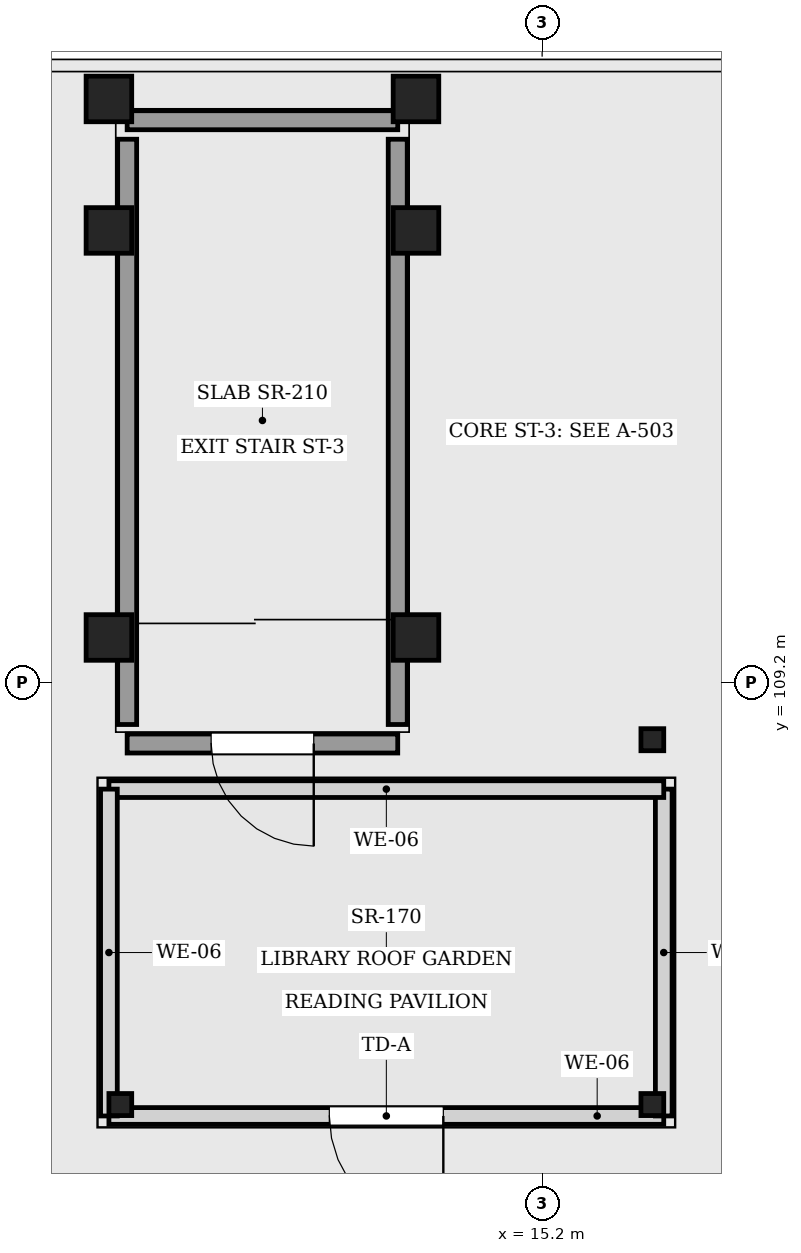
"""IFC4 building model, lengths in metres.
Left out: names, types, materials, properties, quantities, classifications, styles, units other than length and angle.
Written with IfcOpenShell. Run it as: python <this file> out.ifc"""

import sys

from ifc_helpers import new_model, si_unit, direction, frame, frame_2d, origin, origin_2d, place, context, subcontext, project, spatial, rectangle, i_section, extrude, element, fill, save


model = new_model("IFC4")
c1 = context("Model", 3, precision=1e-05, world=origin(), true_north=direction((0.0, 1.0)))
c2 = subcontext(c1, "Body", "Model", "MODEL_VIEW")
j1 = project(units=[si_unit("LENGTHUNIT", "METRE"), si_unit("PLANEANGLEUNIT", "RADIAN")], contexts=[c1])
p1 = place(None, origin())
s1 = spatial("IfcSite", under=j1, at=p1, CompositionType="ELEMENT")
p2 = place(p1, origin())
s2 = spatial("IfcBuilding", under=s1, at=p2, CompositionType="ELEMENT")
p3 = place(p2, frame((0.0, 0.0, 21.3)))
s3 = spatial("IfcBuildingStorey", under=s2, at=p3, CompositionType="ELEMENT", Elevation=21.3)
for number, where, z_axis, x_axis in (
    (1, (13.54, 109.795, 0.0), (0.0, 0.0, 1.0), (1.0, 0.0, 0.0)),
    (2, (9.5, 109.795, 0.0), (0.0, 0.0, 1.0), (1.0, 0.0, 0.0)),
    (3, (13.54, 115.15, 0.0), (0.0, 0.0, 1.0), (1.0, 0.0, 0.0)),
    (4, (9.5, 115.15, 0.0), (0.0, 0.0, 1.0), (1.0, 0.0, 0.0)),
    (5, (13.54, 116.88, 0.0), (0.0, 0.0, 1.0), (1.0, 0.0, 0.0)),
    (6, (9.5, 116.88, 0.0), (0.0, 0.0, 1.0), (1.0, 0.0, 0.0)),
):
    element("IfcColumn", number, at=place(p3, frame(where, z_axis=z_axis, x_axis=x_axis)), inside=s3, PredefinedType="COLUMN", context=c2, shape_type="SweptSolid", body=[
        extrude(rectangle(XDim=0.6, YDim=0.6, at=origin_2d()), origin(), (0.0, 0.0, 1.0), 3.1),
    ])
p4 = place(p3, frame((9.65, 103.65, 0.0), z_axis=(0.0, 0.0, 1.0), x_axis=(1.0, 0.0, 0.0)))
e7 = element("IfcColumn", 7, at=p4, inside=s3, PredefinedType="COLUMN", context=c2, shape_type="SweptSolid", body=[
    extrude(i_section(OverallWidth=0.3, OverallDepth=0.29, WebThickness=0.009, FlangeThickness=0.014, at=origin_2d()), origin(), (0.0, 0.0, 1.0), 3.0),
])
for number, where, z_axis, x_axis in (
    (8, (16.65, 103.65, 0.0), (0.0, 0.0, 1.0), (1.0, 0.0, 0.0)),
    (9, (16.65, 108.45, 0.0), (0.0, 0.0, 1.0), (1.0, 0.0, 0.0)),
):
    element("IfcColumn", number, at=place(p3, frame(where, z_axis=z_axis, x_axis=x_axis)), inside=s3, PredefinedType="COLUMN", context=c2, shape_type="SweptSolid", body=[
        extrude(i_section(OverallWidth=0.3, OverallDepth=0.29, WebThickness=0.009, FlangeThickness=0.014, at=origin_2d()), origin(), (0.0, 0.0, 1.0), 4.888),
    ])
p5 = place(p3, frame((16.8, 103.5, 0.0), z_axis=(0.0, 0.0, 1.0), x_axis=(-1.0, 0.0, 0.0)))
e10 = element("IfcWall", 10, at=p5, inside=s3, PredefinedType="STANDARD", context=c2, shape_type="SweptSolid", body=[
    extrude(rectangle(XDim=7.3, YDim=0.22, at=frame_2d((3.65, 0.0))), origin(), (0.0, 0.0, 1.0), 3.944),
])
p6 = place(p5, frame((2.9, 0.0, 0.0)))
e11 = element("IfcOpeningElement", 11, at=p6, cuts=e10, PredefinedType="OPENING", context=c2, shape_type="SweptSolid", body=[
    extrude(rectangle(XDim=1.5, YDim=2.2, at=frame_2d((0.75, 1.1))), frame((0.0, 0.12, 0.0), z_axis=(0.0, -1.0, 0.0), x_axis=(1.0, 0.0, 0.0)), (0.0, 0.0, 1.0), 0.24),
])
p7 = place(p3, frame((16.8, 107.8, 0.0), z_axis=(0.0, 0.0, 1.0), x_axis=(0.0, -1.0, 0.0)))
e12 = element("IfcWall", 12, at=p7, inside=s3, PredefinedType="STANDARD", context=c2, shape_type="SweptSolid", body=[
    extrude(rectangle(XDim=4.3, YDim=0.22, at=frame_2d((2.15, 0.0))), origin(), (0.0, 0.0, 1.0), 4.708),
])
p8 = place(p3, frame((9.5, 107.8, 0.0), z_axis=(0.0, 0.0, 1.0), x_axis=(1.0, 0.0, 0.0)))
e13 = element("IfcWall", 13, at=p8, inside=s3, PredefinedType="STANDARD", context=c2, shape_type="SweptSolid", body=[
    extrude(rectangle(XDim=7.3, YDim=0.22, at=frame_2d((3.65, 0.0))), origin(), (0.0, 0.0, 1.0), 3.0),
])
p9 = place(p3, frame((9.5, 103.5, 0.0), z_axis=(0.0, 0.0, 1.0), x_axis=(0.0, 1.0, 0.0)))
e14 = element("IfcWall", 14, at=p9, inside=s3, PredefinedType="STANDARD", context=c2, shape_type="SweptSolid", body=[
    extrude(rectangle(XDim=4.3, YDim=0.22, at=frame_2d((2.15, 0.0))), origin(), (0.0, 0.0, 1.0), 3.0),
])
p10 = place(p3, frame((13.3, 108.4, 0.0), z_axis=(0.0, 0.0, 1.0), x_axis=(-1.0, 0.0, 0.0)))
e15 = element("IfcWall", 15, at=p10, inside=s3, PredefinedType="SHEAR", context=c2, shape_type="SweptSolid", body=[
    extrude(rectangle(XDim=3.56, YDim=0.25, at=frame_2d((1.78, 0.0))), origin(), (0.0, 0.0, 1.0), 3.1),
])
p11 = place(p10, frame((1.105, 0.0, 0.0)))
e16 = element("IfcOpeningElement", 16, at=p11, cuts=e15, PredefinedType="OPENING", context=c2, shape_type="SweptSolid", body=[
    extrude(rectangle(XDim=1.35, YDim=2.2, at=frame_2d((0.675, 1.1))), frame((0.0, 0.135, 0.0), z_axis=(0.0, -1.0, 0.0), x_axis=(1.0, 0.0, 0.0)), (0.0, 0.0, 1.0), 0.27),
])
p12 = place(p3, frame((9.74, 108.65, 0.0), z_axis=(0.0, 0.0, 1.0), x_axis=(0.0, 1.0, 0.0)))
e17 = element("IfcWall", 17, at=p12, inside=s3, PredefinedType="SHEAR", context=c2, shape_type="SweptSolid", body=[
    extrude(rectangle(XDim=7.7, YDim=0.25, at=frame_2d((3.85, 0.0))), origin(), (0.0, 0.0, 1.0), 3.1),
])
p13 = place(p3, frame((9.74, 116.6, 0.0), z_axis=(0.0, 0.0, 1.0), x_axis=(1.0, 0.0, 0.0)))
e18 = element("IfcWall", 18, at=p13, inside=s3, PredefinedType="SHEAR", context=c2, shape_type="SweptSolid", body=[
    extrude(rectangle(XDim=3.56, YDim=0.25, at=frame_2d((1.78, 0.0))), origin(), (0.0, 0.0, 1.0), 3.1),
])
p14 = place(p3, frame((13.3, 116.35, 0.0), z_axis=(0.0, 0.0, 1.0), x_axis=(0.0, -1.0, 0.0)))
e19 = element("IfcWall", 19, at=p14, inside=s3, PredefinedType="SHEAR", context=c2, shape_type="SweptSolid", body=[
    extrude(rectangle(XDim=7.7, YDim=0.25, at=frame_2d((3.85, 0.0))), origin(), (0.0, 0.0, 1.0), 3.1),
])
p15 = place(p6, origin())
e20 = element("IfcDoor", 20, at=p15, inside=s3, OperationType="SINGLE_SWING_LEFT", PredefinedType="DOOR", context=c2, shape_type="SweptSolid", body=[
    extrude(rectangle(XDim=1.5, YDim=2.2, at=frame_2d((0.75, 1.1))), frame((0.0, 0.025, 0.0), z_axis=(0.0, -1.0, 0.0), x_axis=(1.0, 0.0, 0.0)), (0.0, 0.0, 1.0), 0.05),
])
fill(e11, e20)
p16 = place(p11, origin())
e21 = element("IfcDoor", 21, at=p16, inside=s3, OperationType="SINGLE_SWING_LEFT", PredefinedType="DOOR", context=c2, shape_type="SweptSolid", body=[
    extrude(rectangle(XDim=1.35, YDim=2.2, at=frame_2d((0.675, 1.1))), frame((0.0, 0.025, 0.0), z_axis=(0.0, -1.0, 0.0), x_axis=(1.0, 0.0, 0.0)), (0.0, 0.0, 1.0), 0.05),
])
fill(e16, e21)
save(model, sys.argv[1])
